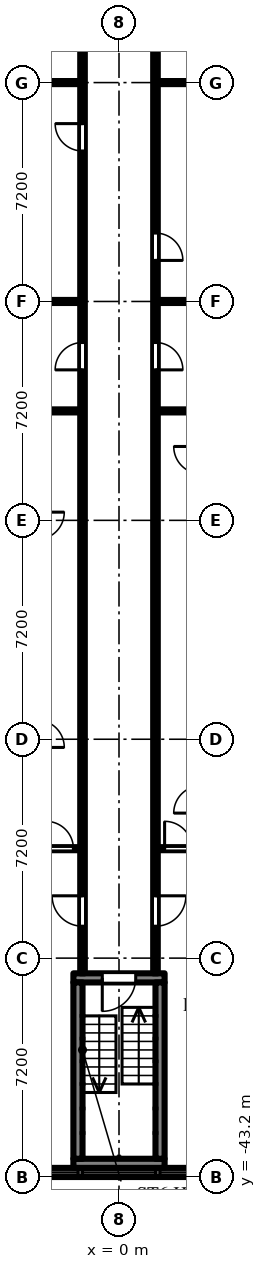
"""IFC4 building model, lengths in metres.
Left out: names, types, materials, properties, quantities, classifications, styles, units other than length and angle.
Written with IfcOpenShell. Run it as: python <this file> out.ifc"""

import sys

from ifc_helpers import new_model, si_unit, direction, frame, frame_2d, origin, place, context, subcontext, project, spatial, rectangle, extrude, element, fill, save


model = new_model("IFC4")
c1 = context("Model", 3, precision=1e-05, world=origin(), true_north=direction((0.0, 1.0)))
c2 = subcontext(c1, "Body", "Model", "MODEL_VIEW")
j1 = project(units=[si_unit("LENGTHUNIT", "METRE"), si_unit("PLANEANGLEUNIT", "RADIAN")], contexts=[c1])
p1 = place(None, origin())
s1 = spatial("IfcSite", under=j1, at=p1, CompositionType="ELEMENT")
p2 = place(p1, origin())
s2 = spatial("IfcBuilding", under=s1, at=p2, CompositionType="ELEMENT")
p3 = place(p2, frame((0.0, 0.0, 44.7)))
s3 = spatial("IfcBuildingStorey", under=s2, at=p3, CompositionType="ELEMENT", Elevation=44.7)
p4 = place(p3, frame((-2.7, -43.05, 0.0), z_axis=(0.0, 0.0, 1.0), x_axis=(1.0, 0.0, 0.0)))
e1 = element("IfcWall", 1, at=p4, inside=s3, PredefinedType="SOLIDWALL", context=c2, shape_type="SweptSolid", body=[
    extrude(rectangle(XDim=5.4, YDim=0.3, at=frame_2d((2.7, 0.0))), origin(), (0.0, 0.0, 1.0), 2.1),
])
p5 = place(p4, frame((1.5, 0.0, 0.2)))
e2 = element("IfcOpeningElement", 2, at=p5, cuts=e1, PredefinedType="OPENING", context=c2, shape_type="SweptSolid", body=[
    extrude(rectangle(XDim=2.4, YDim=1.85, at=frame_2d((1.2, 0.925))), frame((0.0, 0.16, 0.0), z_axis=(0.0, -1.0, 0.0), x_axis=(1.0, 0.0, 0.0)), (0.0, 0.0, 1.0), 0.32),
])
p6 = place(p4, frame((0.15, 0.0, 0.2)))
e3 = element("IfcOpeningElement", 3, at=p6, cuts=e1, PredefinedType="OPENING", context=c2, shape_type="SweptSolid", body=[
    extrude(rectangle(XDim=1.2, YDim=1.85, at=frame_2d((0.6, 0.925))), frame((0.0, 0.16, 0.0), z_axis=(0.0, -1.0, 0.0), x_axis=(1.0, 0.0, 0.0)), (0.0, 0.0, 1.0), 0.32),
])
p7 = place(p4, frame((4.05, 0.0, 0.2)))
e4 = element("IfcOpeningElement", 4, at=p7, cuts=e1, PredefinedType="OPENING", context=c2, shape_type="SweptSolid", body=[
    extrude(rectangle(XDim=1.2, YDim=1.85, at=frame_2d((0.6, 0.925))), frame((0.0, 0.16, 0.0), z_axis=(0.0, -1.0, 0.0), x_axis=(1.0, 0.0, 0.0)), (0.0, 0.0, 1.0), 0.32),
])
p8 = place(p3, frame((-1.5, -36.65, 0.0), z_axis=(0.0, 0.0, 1.0), x_axis=(1.0, 0.0, 0.0)))
e5 = element("IfcWall", 5, at=p8, inside=s3, PredefinedType="SHEAR", context=c2, shape_type="SweptSolid", body=[
    extrude(rectangle(XDim=3.0, YDim=0.3, at=frame_2d((1.5, 0.0))), origin(), (0.0, 0.0, 1.0), 2.575),
])
p9 = place(p8, frame((0.95, 0.0, 0.0)))
e6 = element("IfcOpeningElement", 6, at=p9, cuts=e5, PredefinedType="OPENING", context=c2, shape_type="SweptSolid", body=[
    extrude(rectangle(XDim=1.1, YDim=2.1, at=frame_2d((0.55, 1.05))), frame((0.0, 0.16, 0.0), z_axis=(0.0, -1.0, 0.0), x_axis=(1.0, 0.0, 0.0)), (0.0, 0.0, 1.0), 0.32),
])
p10 = place(p3, frame((-1.5, -42.75, 0.0), z_axis=(0.0, 0.0, 1.0), x_axis=(1.0, 0.0, 0.0)))
e7 = element("IfcWall", 7, at=p10, inside=s3, PredefinedType="SHEAR", context=c2, shape_type="SweptSolid", body=[
    extrude(rectangle(XDim=3.0, YDim=0.3, at=frame_2d((1.5, 0.0))), origin(), (0.0, 0.0, 1.0), 2.575),
])
for number, where, z_axis, x_axis in (
    (8, (-1.35, -36.8, 0.0), (0.0, 0.0, 1.0), (0.0, -1.0, 0.0)),
    (9, (1.35, -36.8, 0.0), (0.0, 0.0, 1.0), (0.0, -1.0, 0.0)),
):
    element("IfcWall", number, at=place(p3, frame(where, z_axis=z_axis, x_axis=x_axis)), inside=s3, PredefinedType="SHEAR", context=c2, shape_type="SweptSolid", body=[
        extrude(rectangle(XDim=5.8, YDim=0.3, at=frame_2d((2.9, 0.0))), origin(), (0.0, 0.0, 1.0), 2.575),
    ])
p11 = place(p3, frame((-6.9, -32.4, 0.0), z_axis=(0.0, 0.0, 1.0), x_axis=(1.0, 0.0, 0.0)))
e10 = element("IfcWall", 10, at=p11, inside=s3, PredefinedType="PARTITIONING", context=c2, shape_type="SweptSolid", body=[
    extrude(rectangle(XDim=5.625, YDim=0.1, at=frame_2d((2.812, 0.0))), origin(), (0.0, 0.0, 1.0), 2.575),
])
p12 = place(p11, frame((4.5, 0.0, 0.0)))
e11 = element("IfcOpeningElement", 11, at=p12, cuts=e10, PredefinedType="OPENING", context=c2, shape_type="SweptSolid", body=[
    extrude(rectangle(XDim=0.9, YDim=2.1, at=frame_2d((0.45, 1.05))), frame((0.0, 0.06, 0.0), z_axis=(0.0, -1.0, 0.0), x_axis=(1.0, 0.0, 0.0)), (0.0, 0.0, 1.0), 0.12),
])
p13 = place(p3, frame((-6.9, -18.0, 0.0), z_axis=(0.0, 0.0, 1.0), x_axis=(1.0, 0.0, 0.0)))
e12 = element("IfcWall", 12, at=p13, inside=s3, PredefinedType="PARTITIONING", context=c2, shape_type="SweptSolid", body=[
    extrude(rectangle(XDim=5.625, YDim=0.1, at=frame_2d((2.812, 0.0))), origin(), (0.0, 0.0, 1.0), 2.575),
])
for number, where, z_axis, x_axis in (
    (13, (-3.9, -14.4, 0.0), (0.0, 0.0, 1.0), (1.0, 0.0, 0.0)),
    (14, (-3.9, -7.2, 0.0), (0.0, 0.0, 1.0), (1.0, 0.0, 0.0)),
):
    element("IfcWall", number, at=place(p3, frame(where, z_axis=z_axis, x_axis=x_axis)), inside=s3, PredefinedType="PARTITIONING", context=c2, shape_type="SweptSolid", body=[
        extrude(rectangle(XDim=2.625, YDim=0.1, at=frame_2d((1.312, 0.0))), origin(), (0.0, 0.0, 1.0), 2.575),
    ])
p14 = place(p3, frame((-1.2, -36.5, 0.0), z_axis=(0.0, 0.0, 1.0), x_axis=(0.0, 1.0, 0.0)))
e15 = element("IfcWall", 15, at=p14, inside=s3, PredefinedType="PARTITIONING", context=c2, shape_type="SweptSolid", body=[
    extrude(rectangle(XDim=35.225, YDim=0.15, at=frame_2d((17.613, 0.0))), origin(), (0.0, 0.0, 1.0), 2.575),
])
p15 = place(p14, frame((31.85, 0.0, 0.0)))
e16 = element("IfcOpeningElement", 16, at=p15, cuts=e15, PredefinedType="OPENING", context=c2, shape_type="SweptSolid", body=[
    extrude(rectangle(XDim=0.9, YDim=2.1, at=frame_2d((0.45, 1.05))), frame((0.0, 0.085, 0.0), z_axis=(0.0, -1.0, 0.0), x_axis=(1.0, 0.0, 0.0)), (0.0, 0.0, 1.0), 0.17),
])
p16 = place(p14, frame((27.05, 0.0, 0.0)))
e17 = element("IfcOpeningElement", 17, at=p16, cuts=e15, PredefinedType="OPENING", context=c2, shape_type="SweptSolid", body=[
    extrude(rectangle(XDim=0.9, YDim=2.1, at=frame_2d((0.45, 1.05))), frame((0.0, 0.085, 0.0), z_axis=(0.0, -1.0, 0.0), x_axis=(1.0, 0.0, 0.0)), (0.0, 0.0, 1.0), 0.17),
])
p17 = place(p14, frame((19.85, 0.0, 0.0)))
e18 = element("IfcOpeningElement", 18, at=p17, cuts=e15, PredefinedType="OPENING", context=c2, shape_type="SweptSolid", body=[
    extrude(rectangle(XDim=0.9, YDim=2.1, at=frame_2d((0.45, 1.05))), frame((0.0, 0.085, 0.0), z_axis=(0.0, -1.0, 0.0), x_axis=(1.0, 0.0, 0.0)), (0.0, 0.0, 1.0), 0.17),
])
p18 = place(p14, frame((1.55, 0.0, 0.0)))
e19 = element("IfcOpeningElement", 19, at=p18, cuts=e15, PredefinedType="OPENING", context=c2, shape_type="SweptSolid", body=[
    extrude(rectangle(XDim=1.0, YDim=2.1, at=frame_2d((0.5, 1.05))), frame((0.0, 0.085, 0.0), z_axis=(0.0, -1.0, 0.0), x_axis=(1.0, 0.0, 0.0)), (0.0, 0.0, 1.0), 0.17),
])
p19 = place(p3, frame((1.2, -36.5, 0.0), z_axis=(0.0, 0.0, 1.0), x_axis=(0.0, 1.0, 0.0)))
e20 = element("IfcWall", 20, at=p19, inside=s3, PredefinedType="PARTITIONING", context=c2, shape_type="SweptSolid", body=[
    extrude(rectangle(XDim=35.375, YDim=0.15, at=frame_2d((17.688, 0.0))), origin(), (0.0, 0.0, 1.0), 2.575),
])
p20 = place(p19, frame((30.75, 0.0, 0.0)))
e21 = element("IfcOpeningElement", 21, at=p20, cuts=e20, PredefinedType="OPENING", context=c2, shape_type="SweptSolid", body=[
    extrude(rectangle(XDim=0.9, YDim=2.1, at=frame_2d((0.45, 1.05))), frame((0.0, 0.085, 0.0), z_axis=(0.0, -1.0, 0.0), x_axis=(1.0, 0.0, 0.0)), (0.0, 0.0, 1.0), 0.17),
])
p21 = place(p19, frame((23.45, 0.0, 0.0)))
e22 = element("IfcOpeningElement", 22, at=p21, cuts=e20, PredefinedType="OPENING", context=c2, shape_type="SweptSolid", body=[
    extrude(rectangle(XDim=0.9, YDim=2.1, at=frame_2d((0.45, 1.05))), frame((0.0, 0.085, 0.0), z_axis=(0.0, -1.0, 0.0), x_axis=(1.0, 0.0, 0.0)), (0.0, 0.0, 1.0), 0.17),
])
p22 = place(p19, frame((19.85, 0.0, 0.0)))
e23 = element("IfcOpeningElement", 23, at=p22, cuts=e20, PredefinedType="OPENING", context=c2, shape_type="SweptSolid", body=[
    extrude(rectangle(XDim=0.9, YDim=2.1, at=frame_2d((0.45, 1.05))), frame((0.0, 0.085, 0.0), z_axis=(0.0, -1.0, 0.0), x_axis=(1.0, 0.0, 0.0)), (0.0, 0.0, 1.0), 0.17),
])
p23 = place(p19, frame((1.55, 0.0, 0.0)))
e24 = element("IfcOpeningElement", 24, at=p23, cuts=e20, PredefinedType="OPENING", context=c2, shape_type="SweptSolid", body=[
    extrude(rectangle(XDim=1.0, YDim=2.1, at=frame_2d((0.5, 1.05))), frame((0.0, 0.085, 0.0), z_axis=(0.0, -1.0, 0.0), x_axis=(1.0, 0.0, 0.0)), (0.0, 0.0, 1.0), 0.17),
])
p24 = place(p3, frame((1.275, -32.4, 0.0), z_axis=(0.0, 0.0, 1.0), x_axis=(1.0, 0.0, 0.0)))
e25 = element("IfcWall", 25, at=p24, inside=s3, PredefinedType="PARTITIONING", context=c2, shape_type="SweptSolid", body=[
    extrude(rectangle(XDim=5.625, YDim=0.1, at=frame_2d((2.812, 0.0))), origin(), (0.0, 0.0, 1.0), 2.575),
])
p25 = place(p24, frame((0.225, 0.0, 0.0)))
e26 = element("IfcOpeningElement", 26, at=p25, cuts=e25, PredefinedType="OPENING", context=c2, shape_type="SweptSolid", body=[
    extrude(rectangle(XDim=0.9, YDim=2.1, at=frame_2d((0.45, 1.05))), frame((0.0, 0.06, 0.0), z_axis=(0.0, -1.0, 0.0), x_axis=(1.0, 0.0, 0.0)), (0.0, 0.0, 1.0), 0.12),
])
p26 = place(p3, frame((1.275, -18.0, 0.0), z_axis=(0.0, 0.0, 1.0), x_axis=(1.0, 0.0, 0.0)))
e27 = element("IfcWall", 27, at=p26, inside=s3, PredefinedType="PARTITIONING", context=c2, shape_type="SweptSolid", body=[
    extrude(rectangle(XDim=5.625, YDim=0.1, at=frame_2d((2.812, 0.0))), origin(), (0.0, 0.0, 1.0), 2.575),
])
for number, where, z_axis, x_axis in (
    (28, (1.275, -14.4, 0.0), (0.0, 0.0, 1.0), (1.0, 0.0, 0.0)),
    (29, (1.275, -7.2, 0.0), (0.0, 0.0, 1.0), (1.0, 0.0, 0.0)),
):
    element("IfcWall", number, at=place(p3, frame(where, z_axis=z_axis, x_axis=x_axis)), inside=s3, PredefinedType="PARTITIONING", context=c2, shape_type="SweptSolid", body=[
        extrude(rectangle(XDim=2.625, YDim=0.1, at=frame_2d((1.312, 0.0))), origin(), (0.0, 0.0, 1.0), 2.575),
    ])
p27 = place(p5, origin())
e30 = element("IfcWindow", 30, at=p27, inside=s3, PartitioningType="SINGLE_PANEL", PredefinedType="WINDOW", context=c2, shape_type="SweptSolid", body=[
    extrude(rectangle(XDim=2.4, YDim=1.85, at=frame_2d((1.2, 0.925))), frame((0.0, 0.03, 0.0), z_axis=(0.0, -1.0, 0.0), x_axis=(1.0, 0.0, 0.0)), (0.0, 0.0, 1.0), 0.06),
])
fill(e2, e30)
p28 = place(p6, origin())
e31 = element("IfcWindow", 31, at=p28, inside=s3, PartitioningType="SINGLE_PANEL", PredefinedType="WINDOW", context=c2, shape_type="SweptSolid", body=[
    extrude(rectangle(XDim=1.2, YDim=1.85, at=frame_2d((0.6, 0.925))), frame((0.0, 0.03, 0.0), z_axis=(0.0, -1.0, 0.0), x_axis=(1.0, 0.0, 0.0)), (0.0, 0.0, 1.0), 0.06),
])
fill(e3, e31)
p29 = place(p7, origin())
e32 = element("IfcWindow", 32, at=p29, inside=s3, PartitioningType="SINGLE_PANEL", PredefinedType="WINDOW", context=c2, shape_type="SweptSolid", body=[
    extrude(rectangle(XDim=1.2, YDim=1.85, at=frame_2d((0.6, 0.925))), frame((0.0, 0.03, 0.0), z_axis=(0.0, -1.0, 0.0), x_axis=(1.0, 0.0, 0.0)), (0.0, 0.0, 1.0), 0.06),
])
fill(e4, e32)
p30 = place(p9, frame((1.1, 0.0, 0.0), z_axis=(0.0, 0.0, 1.0), x_axis=(-1.0, 0.0, 0.0)))
e33 = element("IfcDoor", 33, at=p30, inside=s3, OperationType="SINGLE_SWING_RIGHT", PredefinedType="DOOR", context=c2, shape_type="SweptSolid", body=[
    extrude(rectangle(XDim=1.1, YDim=2.1, at=frame_2d((0.55, 1.05))), frame((0.0, 0.025, 0.0), z_axis=(0.0, -1.0, 0.0), x_axis=(1.0, 0.0, 0.0)), (0.0, 0.0, 1.0), 0.05),
])
fill(e6, e33)
p31 = place(p21, frame((0.9, 0.0, 0.0), z_axis=(0.0, 0.0, 1.0), x_axis=(-1.0, 0.0, 0.0)))
e34 = element("IfcDoor", 34, at=p31, inside=s3, OperationType="SINGLE_SWING_RIGHT", PredefinedType="DOOR", context=c2, shape_type="SweptSolid", body=[
    extrude(rectangle(XDim=0.9, YDim=2.1, at=frame_2d((0.45, 1.05))), frame((0.0, 0.025, 0.0), z_axis=(0.0, -1.0, 0.0), x_axis=(1.0, 0.0, 0.0)), (0.0, 0.0, 1.0), 0.05),
])
fill(e22, e34)
p32 = place(p22, frame((0.9, 0.0, 0.0), z_axis=(0.0, 0.0, 1.0), x_axis=(-1.0, 0.0, 0.0)))
e35 = element("IfcDoor", 35, at=p32, inside=s3, OperationType="SINGLE_SWING_RIGHT", PredefinedType="DOOR", context=c2, shape_type="SweptSolid", body=[
    extrude(rectangle(XDim=0.9, YDim=2.1, at=frame_2d((0.45, 1.05))), frame((0.0, 0.025, 0.0), z_axis=(0.0, -1.0, 0.0), x_axis=(1.0, 0.0, 0.0)), (0.0, 0.0, 1.0), 0.05),
])
fill(e23, e35)
p33 = place(p23, frame((1.0, 0.0, 0.0), z_axis=(0.0, 0.0, 1.0), x_axis=(-1.0, 0.0, 0.0)))
e36 = element("IfcDoor", 36, at=p33, inside=s3, OperationType="SINGLE_SWING_LEFT", PredefinedType="DOOR", context=c2, shape_type="SweptSolid", body=[
    extrude(rectangle(XDim=1.0, YDim=2.1, at=frame_2d((0.5, 1.05))), frame((0.0, 0.025, 0.0), z_axis=(0.0, -1.0, 0.0), x_axis=(1.0, 0.0, 0.0)), (0.0, 0.0, 1.0), 0.05),
])
fill(e24, e36)
p34 = place(p25, origin())
e37 = element("IfcDoor", 37, at=p34, inside=s3, OperationType="SINGLE_SWING_LEFT", PredefinedType="DOOR", context=c2, shape_type="SweptSolid", body=[
    extrude(rectangle(XDim=0.9, YDim=2.1, at=frame_2d((0.45, 1.05))), frame((0.0, 0.025, 0.0), z_axis=(0.0, -1.0, 0.0), x_axis=(1.0, 0.0, 0.0)), (0.0, 0.0, 1.0), 0.05),
])
fill(e26, e37)
p35 = place(p16, origin())
e38 = element("IfcDoor", 38, at=p35, inside=s3, OperationType="SINGLE_SWING_RIGHT", PredefinedType="DOOR", context=c2, shape_type="SweptSolid", body=[
    extrude(rectangle(XDim=0.9, YDim=2.1, at=frame_2d((0.45, 1.05))), frame((0.0, 0.025, 0.0), z_axis=(0.0, -1.0, 0.0), x_axis=(1.0, 0.0, 0.0)), (0.0, 0.0, 1.0), 0.05),
])
fill(e17, e38)
p36 = place(p17, origin())
e39 = element("IfcDoor", 39, at=p36, inside=s3, OperationType="SINGLE_SWING_LEFT", PredefinedType="DOOR", context=c2, shape_type="SweptSolid", body=[
    extrude(rectangle(XDim=0.9, YDim=2.1, at=frame_2d((0.45, 1.05))), frame((0.0, 0.025, 0.0), z_axis=(0.0, -1.0, 0.0), x_axis=(1.0, 0.0, 0.0)), (0.0, 0.0, 1.0), 0.05),
])
fill(e18, e39)
p37 = place(p18, origin())
e40 = element("IfcDoor", 40, at=p37, inside=s3, OperationType="SINGLE_SWING_RIGHT", PredefinedType="DOOR", context=c2, shape_type="SweptSolid", body=[
    extrude(rectangle(XDim=1.0, YDim=2.1, at=frame_2d((0.5, 1.05))), frame((0.0, 0.025, 0.0), z_axis=(0.0, -1.0, 0.0), x_axis=(1.0, 0.0, 0.0)), (0.0, 0.0, 1.0), 0.05),
])
fill(e19, e40)
p38 = place(p12, origin())
e41 = element("IfcDoor", 41, at=p38, inside=s3, OperationType="SINGLE_SWING_LEFT", PredefinedType="DOOR", context=c2, shape_type="SweptSolid", body=[
    extrude(rectangle(XDim=0.9, YDim=2.1, at=frame_2d((0.45, 1.05))), frame((0.0, 0.025, 0.0), z_axis=(0.0, -1.0, 0.0), x_axis=(1.0, 0.0, 0.0)), (0.0, 0.0, 1.0), 0.05),
])
fill(e11, e41)
save(model, sys.argv[1])
